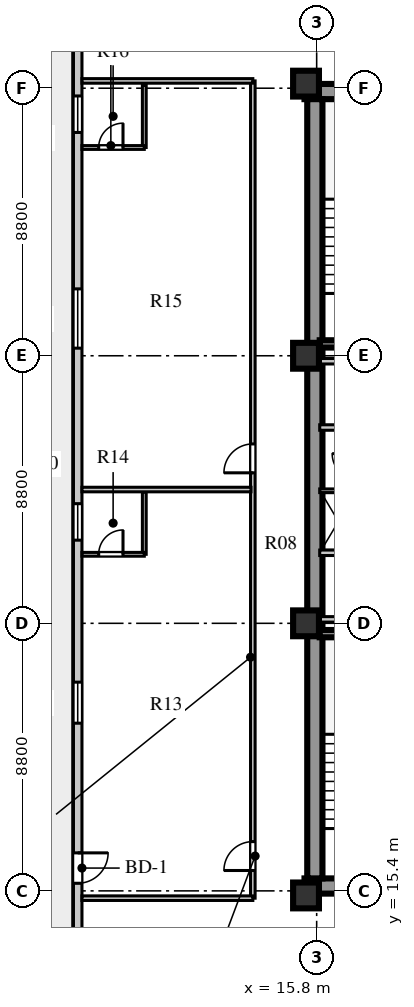
"""IFC4 building model, lengths in metres.
Left out: names, types, materials, properties, quantities, classifications, styles, units other than length and angle.
Written with IfcOpenShell. Run it as: python <this file> out.ifc"""

import sys

from ifc_helpers import new_model, si_unit, direction, frame, frame_2d, origin, origin_2d, place, context, subcontext, project, spatial, rectangle, extrude, element, fill, save


model = new_model("IFC4")
c1 = context("Model", 3, precision=1e-05, world=origin(), true_north=direction((0.0, 1.0)))
c2 = subcontext(c1, "Body", "Model", "MODEL_VIEW")
j1 = project(units=[si_unit("LENGTHUNIT", "METRE"), si_unit("PLANEANGLEUNIT", "RADIAN")], contexts=[c1])
p1 = place(None, origin())
s1 = spatial("IfcSite", under=j1, at=p1, CompositionType="ELEMENT")
p2 = place(p1, origin())
s2 = spatial("IfcBuilding", under=s1, at=p2, CompositionType="ELEMENT")
p3 = place(p2, frame((0.0, 0.0, 196.4)))
s3 = spatial("IfcBuildingStorey", under=s2, at=p3, CompositionType="ELEMENT", Elevation=196.4)
for number, where, z_axis, x_axis in (
    (1, (15.4, 15.56, 0.0), (0.0, 0.0, 1.0), (1.0, 0.0, 0.0)),
    (2, (15.4, 41.69, 0.0), (0.0, 0.0, 1.0), (1.0, 0.0, 0.0)),
):
    element("IfcWall", number, at=place(p3, frame(where, z_axis=z_axis, x_axis=x_axis)), inside=s3, PredefinedType="SHEAR", context=c2, shape_type="SweptSolid", body=[
        extrude(rectangle(XDim=9.68, YDim=0.5, at=frame_2d((4.84, 0.0))), origin(), (0.0, 0.0, 1.0), 3.6),
    ])
p4 = place(p3, frame((15.74, 15.81, 0.0), z_axis=(0.0, 0.0, 1.0), x_axis=(0.0, 1.0, 0.0)))
e3 = element("IfcWall", 3, at=p4, inside=s3, PredefinedType="SHEAR", context=c2, shape_type="SweptSolid", body=[
    extrude(rectangle(XDim=25.63, YDim=0.5, at=frame_2d((12.815, 0.0))), origin(), (0.0, 0.0, 1.0), 3.6),
])
for number, where, z_axis, x_axis in (
    (4, (15.45, 15.25, 0.0), (0.0, 0.0, 1.0), (1.0, 0.0, 0.0)),
    (5, (15.45, 24.2, 0.0), (0.0, 0.0, 1.0), (1.0, 0.0, 0.0)),
    (6, (15.45, 33.0, 0.0), (0.0, 0.0, 1.0), (1.0, 0.0, 0.0)),
    (7, (15.45, 41.95, 0.0), (0.0, 0.0, 1.0), (1.0, 0.0, 0.0)),
):
    element("IfcColumn", number, at=place(p3, frame(where, z_axis=z_axis, x_axis=x_axis)), inside=s3, PredefinedType="COLUMN", context=c2, shape_type="SweptSolid", body=[
        extrude(rectangle(XDim=0.85, YDim=0.85, at=origin_2d()), origin(), (0.0, 0.0, 1.0), 3.6),
    ])
p5 = place(p3, frame((7.94, 44.07, 0.0), z_axis=(0.0, 0.0, 1.0), x_axis=(0.0, -1.0, 0.0)))
e8 = element("IfcWall", 8, at=p5, inside=s3, PredefinedType="STANDARD", context=c2, shape_type="SweptSolid", body=[
    extrude(rectangle(XDim=30.94, YDim=0.28, at=frame_2d((15.47, 0.0))), origin(), (0.0, 0.0, 1.0), 3.6),
])
p6 = place(p5, frame((27.42, 0.0, 0.0)))
e9 = element("IfcOpeningElement", 9, at=p6, cuts=e8, PredefinedType="OPENING", context=c2, shape_type="SweptSolid", body=[
    extrude(rectangle(XDim=1.0, YDim=2.05, at=frame_2d((0.5, 1.025))), frame((0.0, 0.15, 0.0), z_axis=(0.0, -1.0, 0.0), x_axis=(1.0, 0.0, 0.0)), (0.0, 0.0, 1.0), 0.3),
])
p7 = place(p5, frame((21.805, 0.0, 0.8)))
e10 = element("IfcOpeningElement", 10, at=p7, cuts=e8, PredefinedType="OPENING", context=c2, shape_type="SweptSolid", body=[
    extrude(rectangle(XDim=1.35, YDim=1.9, at=frame_2d((0.675, 0.95))), frame((0.0, 0.15, 0.0), z_axis=(0.0, -1.0, 0.0), x_axis=(1.0, 0.0, 0.0)), (0.0, 0.0, 1.0), 0.3),
])
p8 = place(p5, frame((15.935, 0.0, 0.8)))
e11 = element("IfcOpeningElement", 11, at=p8, cuts=e8, PredefinedType="OPENING", context=c2, shape_type="SweptSolid", body=[
    extrude(rectangle(XDim=1.2, YDim=1.75, at=frame_2d((0.6, 0.875))), frame((0.0, 0.15, 0.0), z_axis=(0.0, -1.0, 0.0), x_axis=(1.0, 0.0, 0.0)), (0.0, 0.0, 1.0), 0.3),
])
p9 = place(p5, frame((8.87, 0.0, 0.8)))
e12 = element("IfcOpeningElement", 12, at=p9, cuts=e8, PredefinedType="OPENING", context=c2, shape_type="SweptSolid", body=[
    extrude(rectangle(XDim=1.95, YDim=2.0, at=frame_2d((0.975, 1.0))), frame((0.0, 0.15, 0.0), z_axis=(0.0, -1.0, 0.0), x_axis=(1.0, 0.0, 0.0)), (0.0, 0.0, 1.0), 0.3),
])
p10 = place(p5, frame((2.525, 0.0, 0.8)))
e13 = element("IfcOpeningElement", 13, at=p10, cuts=e8, PredefinedType="OPENING", context=c2, shape_type="SweptSolid", body=[
    extrude(rectangle(XDim=1.2, YDim=1.75, at=frame_2d((0.6, 0.875))), frame((0.0, 0.15, 0.0), z_axis=(0.0, -1.0, 0.0), x_axis=(1.0, 0.0, 0.0)), (0.0, 0.0, 1.0), 0.3),
])
p11 = place(p3, frame((15.9, 23.86, 0.0), z_axis=(0.0, 0.0, 1.0), x_axis=(1.0, 0.0, 0.0)))
e14 = element("IfcWall", 14, at=p11, inside=s3, PredefinedType="SHEAR", context=c2, shape_type="SweptSolid", body=[
    extrude(rectangle(XDim=3.52, YDim=0.24, at=frame_2d((1.76, 0.0))), origin(), (0.0, 0.0, 1.0), 3.85),
])
p12 = place(p3, frame((15.9, 26.52, 0.0), z_axis=(0.0, 0.0, 1.0), x_axis=(1.0, 0.0, 0.0)))
e15 = element("IfcWall", 15, at=p12, inside=s3, PredefinedType="SOLIDWALL", context=c2, shape_type="SweptSolid", body=[
    extrude(rectangle(XDim=8.68, YDim=0.18, at=frame_2d((4.34, 0.0))), origin(), (0.0, 0.0, 1.0), 3.6),
])
p13 = place(p12, frame((3.3, 0.0, 0.0)))
e16 = element("IfcOpeningElement", 16, at=p13, cuts=e15, PredefinedType="OPENING", context=c2, shape_type="SweptSolid", body=[
    extrude(rectangle(XDim=0.95, YDim=2.1, at=frame_2d((0.475, 1.05))), frame((0.0, 0.1, 0.0), z_axis=(0.0, -1.0, 0.0), x_axis=(1.0, 0.0, 0.0)), (0.0, 0.0, 1.0), 0.2),
])
p14 = place(p3, frame((15.9, 24.33, 0.0), z_axis=(0.0, 0.0, 1.0), x_axis=(1.0, 0.0, 0.0)))
e17 = element("IfcWall", 17, at=p14, inside=s3, PredefinedType="SOLIDWALL", context=c2, shape_type="SweptSolid", body=[
    extrude(rectangle(XDim=8.68, YDim=0.18, at=frame_2d((4.34, 0.0))), origin(), (0.0, 0.0, 1.0), 2.95),
])
p15 = place(p3, frame((15.9, 28.56, 0.0), z_axis=(0.0, 0.0, 1.0), x_axis=(1.0, 0.0, 0.0)))
e18 = element("IfcWall", 18, at=p15, inside=s3, PredefinedType="PARTITIONING", context=c2, shape_type="SweptSolid", body=[
    extrude(rectangle(XDim=1.2, YDim=0.12, at=frame_2d((0.6, 0.0))), origin(), (0.0, 0.0, 1.0), 3.6),
])
p16 = place(p3, frame((15.9, 30.64, 0.0), z_axis=(0.0, 0.0, 1.0), x_axis=(1.0, 0.0, 0.0)))
e19 = element("IfcWall", 19, at=p16, inside=s3, PredefinedType="SOLIDWALL", context=c2, shape_type="SweptSolid", body=[
    extrude(rectangle(XDim=8.68, YDim=0.18, at=frame_2d((4.34, 0.0))), origin(), (0.0, 0.0, 1.0), 3.6),
])
p17 = place(p16, frame((1.76, 0.0, 0.0)))
e20 = element("IfcOpeningElement", 20, at=p17, cuts=e19, PredefinedType="OPENING", context=c2, shape_type="SweptSolid", body=[
    extrude(rectangle(XDim=1.0, YDim=2.1, at=frame_2d((0.5, 1.05))), frame((0.0, 0.1, 0.0), z_axis=(0.0, -1.0, 0.0), x_axis=(1.0, 0.0, 0.0)), (0.0, 0.0, 1.0), 0.2),
])
p18 = place(p16, frame((3.6, 0.0, 0.0)))
e21 = element("IfcOpeningElement", 21, at=p18, cuts=e19, PredefinedType="OPENING", context=c2, shape_type="SweptSolid", body=[
    extrude(rectangle(XDim=1.0, YDim=2.1, at=frame_2d((0.5, 1.05))), frame((0.0, 0.1, 0.0), z_axis=(0.0, -1.0, 0.0), x_axis=(1.0, 0.0, 0.0)), (0.0, 0.0, 1.0), 0.2),
])
p19 = place(p16, frame((5.44, 0.0, 0.0)))
e22 = element("IfcOpeningElement", 22, at=p19, cuts=e19, PredefinedType="OPENING", context=c2, shape_type="SweptSolid", body=[
    extrude(rectangle(XDim=1.0, YDim=2.1, at=frame_2d((0.5, 1.05))), frame((0.0, 0.1, 0.0), z_axis=(0.0, -1.0, 0.0), x_axis=(1.0, 0.0, 0.0)), (0.0, 0.0, 1.0), 0.2),
])
p20 = place(p16, frame((7.28, 0.0, 0.0)))
e23 = element("IfcOpeningElement", 23, at=p20, cuts=e19, PredefinedType="OPENING", context=c2, shape_type="SweptSolid", body=[
    extrude(rectangle(XDim=1.0, YDim=2.1, at=frame_2d((0.5, 1.05))), frame((0.0, 0.1, 0.0), z_axis=(0.0, -1.0, 0.0), x_axis=(1.0, 0.0, 0.0)), (0.0, 0.0, 1.0), 0.2),
])
p21 = place(p3, frame((15.9, 32.82, 0.0), z_axis=(0.0, 0.0, 1.0), x_axis=(1.0, 0.0, 0.0)))
e24 = element("IfcWall", 24, at=p21, inside=s3, PredefinedType="SOLIDWALL", context=c2, shape_type="SweptSolid", body=[
    extrude(rectangle(XDim=8.68, YDim=0.18, at=frame_2d((4.34, 0.0))), origin(), (0.0, 0.0, 1.0), 2.95),
])
p22 = place(p3, frame((15.9, 33.39, 0.0), z_axis=(0.0, 0.0, 1.0), x_axis=(1.0, 0.0, 0.0)))
e25 = element("IfcWall", 25, at=p22, inside=s3, PredefinedType="SHEAR", context=c2, shape_type="SweptSolid", body=[
    extrude(rectangle(XDim=3.52, YDim=0.24, at=frame_2d((1.76, 0.0))), origin(), (0.0, 0.0, 1.0), 3.85),
])
p23 = place(p3, frame((13.7, 15.16, 0.0), z_axis=(0.0, 0.0, 1.0), x_axis=(0.0, 1.0, 0.0)))
e26 = element("IfcWall", 26, at=p23, inside=s3, PredefinedType="PARTITIONING", context=c2, shape_type="SweptSolid", body=[
    extrude(rectangle(XDim=26.88, YDim=0.15, at=frame_2d((13.44, 0.0))), origin(), (0.0, 0.0, 1.0), 3.6),
])
p24 = place(p23, frame((0.91, 0.0, 0.0)))
e27 = element("IfcOpeningElement", 27, at=p24, cuts=e26, PredefinedType="OPENING", context=c2, shape_type="SweptSolid", body=[
    extrude(rectangle(XDim=0.95, YDim=2.1, at=frame_2d((0.475, 1.05))), frame((0.0, 0.085, 0.0), z_axis=(0.0, -1.0, 0.0), x_axis=(1.0, 0.0, 0.0)), (0.0, 0.0, 1.0), 0.17),
])
p25 = place(p23, frame((13.99, 0.0, 0.0)))
e28 = element("IfcOpeningElement", 28, at=p25, cuts=e26, PredefinedType="OPENING", context=c2, shape_type="SweptSolid", body=[
    extrude(rectangle(XDim=0.95, YDim=2.1, at=frame_2d((0.475, 1.05))), frame((0.0, 0.085, 0.0), z_axis=(0.0, -1.0, 0.0), x_axis=(1.0, 0.0, 0.0)), (0.0, 0.0, 1.0), 0.17),
])
for number, where, z_axis, x_axis in (
    (29, (8.08, 15.16, 0.0), (0.0, 0.0, 1.0), (1.0, 0.0, 0.0)),
    (30, (8.08, 42.04, 0.0), (0.0, 0.0, 1.0), (1.0, 0.0, 0.0)),
):
    element("IfcWall", number, at=place(p3, frame(where, z_axis=z_axis, x_axis=x_axis)), inside=s3, PredefinedType="PARTITIONING", context=c2, shape_type="SweptSolid", body=[
        extrude(rectangle(XDim=5.62, YDim=0.15, at=frame_2d((2.81, 0.0))), origin(), (0.0, 0.0, 1.0), 3.15),
    ])
p26 = place(p3, frame((10.13, 26.47, 0.0), z_axis=(0.0, 0.0, 1.0), x_axis=(0.0, 1.0, 0.0)))
e31 = element("IfcWall", 31, at=p26, inside=s3, PredefinedType="PLUMBINGWALL", context=c2, shape_type="SweptSolid", body=[
    extrude(rectangle(XDim=2.05, YDim=0.125, at=frame_2d((1.025, 0.0))), origin(), (0.0, 0.0, 1.0), 3.6),
])
p27 = place(p3, frame((8.08, 26.47, 0.0), z_axis=(0.0, 0.0, 1.0), x_axis=(1.0, 0.0, 0.0)))
e32 = element("IfcWall", 32, at=p27, inside=s3, PredefinedType="PLUMBINGWALL", context=c2, shape_type="SweptSolid", body=[
    extrude(rectangle(XDim=2.05, YDim=0.125, at=frame_2d((1.025, 0.0))), origin(), (0.0, 0.0, 1.0), 3.6),
])
p28 = place(p27, frame((0.55, 0.0, 0.0)))
e33 = element("IfcOpeningElement", 33, at=p28, cuts=e32, PredefinedType="OPENING", context=c2, shape_type="SweptSolid", body=[
    extrude(rectangle(XDim=0.8, YDim=2.05, at=frame_2d((0.4, 1.025))), frame((0.0, 0.073, 0.0), z_axis=(0.0, -1.0, 0.0), x_axis=(1.0, 0.0, 0.0)), (0.0, 0.0, 1.0), 0.145),
])
p29 = place(p3, frame((8.08, 28.6, 0.0), z_axis=(0.0, 0.0, 1.0), x_axis=(1.0, 0.0, 0.0)))
e34 = element("IfcWall", 34, at=p29, inside=s3, PredefinedType="PARTITIONING", context=c2, shape_type="SweptSolid", body=[
    extrude(rectangle(XDim=5.56, YDim=0.15, at=frame_2d((2.78, 0.0))), origin(), (0.0, 0.0, 1.0), 3.6),
])
p30 = place(p3, frame((10.13, 39.85, 0.0), z_axis=(0.0, 0.0, 1.0), x_axis=(0.0, 1.0, 0.0)))
e35 = element("IfcWall", 35, at=p30, inside=s3, PredefinedType="PLUMBINGWALL", context=c2, shape_type="SweptSolid", body=[
    extrude(rectangle(XDim=2.05, YDim=0.125, at=frame_2d((1.025, 0.0))), origin(), (0.0, 0.0, 1.0), 3.6),
])
p31 = place(p3, frame((8.08, 39.85, 0.0), z_axis=(0.0, 0.0, 1.0), x_axis=(1.0, 0.0, 0.0)))
e36 = element("IfcWall", 36, at=p31, inside=s3, PredefinedType="PLUMBINGWALL", context=c2, shape_type="SweptSolid", body=[
    extrude(rectangle(XDim=2.05, YDim=0.125, at=frame_2d((1.025, 0.0))), origin(), (0.0, 0.0, 1.0), 3.6),
])
p32 = place(p31, frame((0.55, 0.0, 0.0)))
e37 = element("IfcOpeningElement", 37, at=p32, cuts=e36, PredefinedType="OPENING", context=c2, shape_type="SweptSolid", body=[
    extrude(rectangle(XDim=0.8, YDim=2.05, at=frame_2d((0.4, 1.025))), frame((0.0, 0.073, 0.0), z_axis=(0.0, -1.0, 0.0), x_axis=(1.0, 0.0, 0.0)), (0.0, 0.0, 1.0), 0.145),
])
p33 = place(p6, frame((1.0, 0.0, 0.0), z_axis=(0.0, 0.0, 1.0), x_axis=(-1.0, 0.0, 0.0)))
e38 = element("IfcDoor", 38, at=p33, inside=s3, OperationType="SINGLE_SWING_RIGHT", PredefinedType="DOOR", context=c2, shape_type="SweptSolid", body=[
    extrude(rectangle(XDim=1.0, YDim=2.05, at=frame_2d((0.5, 1.025))), frame((0.0, 0.025, 0.0), z_axis=(0.0, -1.0, 0.0), x_axis=(1.0, 0.0, 0.0)), (0.0, 0.0, 1.0), 0.05),
])
fill(e9, e38)
p34 = place(p7, origin())
e39 = element("IfcWindow", 39, at=p34, inside=s3, PartitioningType="SINGLE_PANEL", PredefinedType="WINDOW", context=c2, shape_type="SweptSolid", body=[
    extrude(rectangle(XDim=1.35, YDim=1.9, at=frame_2d((0.675, 0.95))), frame((0.0, 0.03, 0.0), z_axis=(0.0, -1.0, 0.0), x_axis=(1.0, 0.0, 0.0)), (0.0, 0.0, 1.0), 0.06),
])
fill(e10, e39)
p35 = place(p8, origin())
e40 = element("IfcWindow", 40, at=p35, inside=s3, PartitioningType="SINGLE_PANEL", PredefinedType="WINDOW", context=c2, shape_type="SweptSolid", body=[
    extrude(rectangle(XDim=1.2, YDim=1.75, at=frame_2d((0.6, 0.875))), frame((0.0, 0.03, 0.0), z_axis=(0.0, -1.0, 0.0), x_axis=(1.0, 0.0, 0.0)), (0.0, 0.0, 1.0), 0.06),
])
fill(e11, e40)
p36 = place(p9, origin())
e41 = element("IfcWindow", 41, at=p36, inside=s3, PartitioningType="SINGLE_PANEL", PredefinedType="WINDOW", context=c2, shape_type="SweptSolid", body=[
    extrude(rectangle(XDim=1.95, YDim=2.0, at=frame_2d((0.975, 1.0))), frame((0.0, 0.03, 0.0), z_axis=(0.0, -1.0, 0.0), x_axis=(1.0, 0.0, 0.0)), (0.0, 0.0, 1.0), 0.06),
])
fill(e12, e41)
p37 = place(p10, origin())
e42 = element("IfcWindow", 42, at=p37, inside=s3, PartitioningType="SINGLE_PANEL", PredefinedType="WINDOW", context=c2, shape_type="SweptSolid", body=[
    extrude(rectangle(XDim=1.2, YDim=1.75, at=frame_2d((0.6, 0.875))), frame((0.0, 0.03, 0.0), z_axis=(0.0, -1.0, 0.0), x_axis=(1.0, 0.0, 0.0)), (0.0, 0.0, 1.0), 0.06),
])
fill(e13, e42)
p38 = place(p24, origin())
e43 = element("IfcDoor", 43, at=p38, inside=s3, OperationType="SINGLE_SWING_LEFT", PredefinedType="DOOR", context=c2, shape_type="SweptSolid", body=[
    extrude(rectangle(XDim=0.95, YDim=2.1, at=frame_2d((0.475, 1.05))), frame((0.0, 0.025, 0.0), z_axis=(0.0, -1.0, 0.0), x_axis=(1.0, 0.0, 0.0)), (0.0, 0.0, 1.0), 0.05),
])
fill(e27, e43)
p39 = place(p28, frame((0.8, 0.0, 0.0), z_axis=(0.0, 0.0, 1.0), x_axis=(-1.0, 0.0, 0.0)))
e44 = element("IfcDoor", 44, at=p39, inside=s3, OperationType="SINGLE_SWING_LEFT", PredefinedType="DOOR", context=c2, shape_type="SweptSolid", body=[
    extrude(rectangle(XDim=0.8, YDim=2.05, at=frame_2d((0.4, 1.025))), frame((0.0, 0.025, 0.0), z_axis=(0.0, -1.0, 0.0), x_axis=(1.0, 0.0, 0.0)), (0.0, 0.0, 1.0), 0.05),
])
fill(e33, e44)
p40 = place(p25, origin())
e45 = element("IfcDoor", 45, at=p40, inside=s3, OperationType="SINGLE_SWING_LEFT", PredefinedType="DOOR", context=c2, shape_type="SweptSolid", body=[
    extrude(rectangle(XDim=0.95, YDim=2.1, at=frame_2d((0.475, 1.05))), frame((0.0, 0.025, 0.0), z_axis=(0.0, -1.0, 0.0), x_axis=(1.0, 0.0, 0.0)), (0.0, 0.0, 1.0), 0.05),
])
fill(e28, e45)
p41 = place(p32, frame((0.8, 0.0, 0.0), z_axis=(0.0, 0.0, 1.0), x_axis=(-1.0, 0.0, 0.0)))
e46 = element("IfcDoor", 46, at=p41, inside=s3, OperationType="SINGLE_SWING_LEFT", PredefinedType="DOOR", context=c2, shape_type="SweptSolid", body=[
    extrude(rectangle(XDim=0.8, YDim=2.05, at=frame_2d((0.4, 1.025))), frame((0.0, 0.025, 0.0), z_axis=(0.0, -1.0, 0.0), x_axis=(1.0, 0.0, 0.0)), (0.0, 0.0, 1.0), 0.05),
])
fill(e37, e46)
save(model, sys.argv[1])
